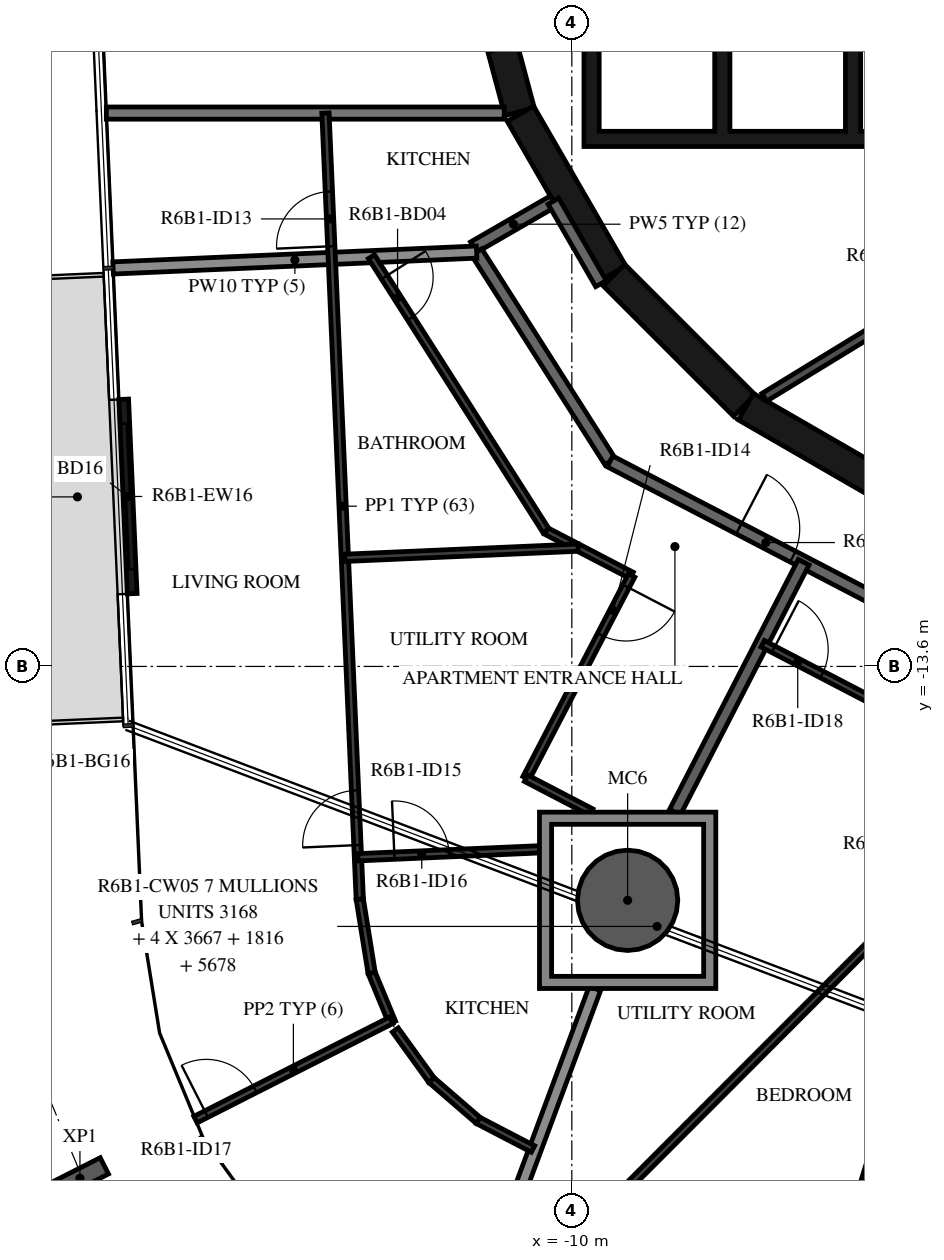
"""IFC4 building model, lengths in metres.
Left out: names, types, materials, properties, quantities, classifications, styles, units other than length and angle.
Written with IfcOpenShell. Run it as: python <this file> out.ifc"""

import sys

from ifc_helpers import new_model, si_unit, direction, frame, frame_2d, origin, origin_2d, place, context, subcontext, project, spatial, polyline, rectangle, hollow_circle, i_section, outline, extrude, element, fill, save


model = new_model("IFC4")
c1 = context("Model", 3, precision=1e-05, world=origin(), true_north=direction((0.0, 1.0)))
c2 = subcontext(c1, "Body", "Model", "MODEL_VIEW")
j1 = project(units=[si_unit("LENGTHUNIT", "METRE"), si_unit("PLANEANGLEUNIT", "RADIAN")], contexts=[c1])
p1 = place(None, origin())
s1 = spatial("IfcSite", under=j1, at=p1, CompositionType="ELEMENT")
p2 = place(p1, origin())
s2 = spatial("IfcBuilding", under=s1, at=p2, CompositionType="ELEMENT")
p3 = place(p2, frame((0.0, 0.0, 237.2)))
s3 = spatial("IfcBuildingStorey", under=s2, at=p3, CompositionType="ELEMENT", Elevation=237.2)
p4 = place(p3, frame((-9.082, -17.446, -0.38), z_axis=(0.0, 0.0, 1.0), x_axis=(1.0, 0.0, 0.0)))
e1 = element("IfcColumn", 1, at=p4, inside=s3, PredefinedType="COLUMN", context=c2, shape_type="SweptSolid", body=[
    extrude(hollow_circle(Radius=0.825, WallThickness=0.04, at=origin_2d()), origin(), (0.0, 0.0, 1.0), 3.5),
])
p5 = place(p3, frame((-18.089, -22.016, -0.38), z_axis=(0.0, 0.0, 1.0), x_axis=(-0.452473836659, 0.89177767809, 0.0)))
e2 = element("IfcColumn", 2, at=p5, inside=s3, PredefinedType="COLUMN", context=c2, shape_type="SweptSolid", body=[
    extrude(i_section(OverallWidth=0.3, OverallDepth=0.9, WebThickness=0.019, FlangeThickness=0.035, FilletRadius=0.03, at=origin_2d()), origin(), (0.0, 0.0, 1.0), 3.5),
])
p6 = place(p3, frame((-17.369, -9.207, 0.0), z_axis=(0.0, 0.0, 1.0), x_axis=(0.043639181999, -0.999047357133, 0.0)))
e3 = element("IfcWall", 3, at=p6, inside=s3, PredefinedType="STANDARD", context=c2, shape_type="SweptSolid", body=[
    extrude(rectangle(XDim=3.2, YDim=0.16, at=frame_2d((1.6, 0.0))), origin(), (0.0, 0.0, 1.0), 3.12),
])
p7 = place(p6, frame((0.4, 0.0, 0.0)))
e4 = element("IfcOpeningElement", 4, at=p7, cuts=e3, PredefinedType="OPENING", context=c2, shape_type="SweptSolid", body=[
    extrude(rectangle(XDim=2.4, YDim=2.4, at=frame_2d((1.2, 1.2))), frame((0.0, 0.09, 0.0), z_axis=(0.0, -1.0, 0.0), x_axis=(1.0, 0.0, 0.0)), (0.0, 0.0, 1.0), 0.18),
])
p8 = place(p3, frame((-11.643, -1.55, 0.0), z_axis=(0.0, 0.0, 1.0), x_axis=(0.258734743916, -0.965948410781, 0.0)))
e5 = element("IfcWall", 5, at=p8, inside=s3, PredefinedType="SHEAR", context=c2, shape_type="SweptSolid", body=[
    extrude(rectangle(XDim=3.033, YDim=0.5, at=frame_2d((1.516, 0.0))), origin(), (0.0, 0.0, 1.0), 3.12),
])
p9 = place(p8, frame((1.066, 0.0, 0.0)))
e6 = element("IfcOpeningElement", 6, at=p9, cuts=e5, PredefinedType="OPENING", context=c2, shape_type="SweptSolid", body=[
    extrude(rectangle(XDim=0.9, YDim=2.1, at=frame_2d((0.45, 1.05))), frame((0.0, 0.26, 0.0), z_axis=(0.0, -1.0, 0.0), x_axis=(1.0, 0.0, 0.0)), (0.0, 0.0, 1.0), 0.52),
])
p10 = place(p3, frame((-10.845, -4.51, 0.0), z_axis=(0.0, 0.0, 1.0), x_axis=(0.500087131594, -0.865975092491, 0.0)))
e7 = element("IfcWall", 7, at=p10, inside=s3, PredefinedType="SHEAR", context=c2, shape_type="SweptSolid", body=[
    extrude(rectangle(XDim=3.033, YDim=0.5, at=frame_2d((1.516, 0.0))), origin(), (0.0, 0.0, 1.0), 3.12),
])
p11 = place(p3, frame((-9.308, -7.164, 0.0), z_axis=(0.0, 0.0, 1.0), x_axis=(0.707106781187, -0.707106781187, 0.0)))
e8 = element("IfcWall", 8, at=p11, inside=s3, PredefinedType="SHEAR", context=c2, shape_type="SweptSolid", body=[
    extrude(rectangle(XDim=3.032, YDim=0.5, at=frame_2d((1.516, 0.0))), origin(), (0.0, 0.0, 1.0), 3.12),
])
p12 = place(p3, frame((-7.137, -9.329, 0.0), z_axis=(0.0, 0.0, 1.0), x_axis=(0.865975092491, -0.500087131594, 0.0)))
e9 = element("IfcWall", 9, at=p12, inside=s3, PredefinedType="SHEAR", context=c2, shape_type="SweptSolid", body=[
    extrude(rectangle(XDim=3.033, YDim=0.5, at=frame_2d((1.516, 0.0))), origin(), (0.0, 0.0, 1.0), 3.12),
])
p13 = place(p3, origin())
e10 = element("IfcWall", 10, at=p13, inside=s3, PredefinedType="SHEAR", context=c2, shape_type="SweptSolid", body=[
    extrude(outline(polyline([(9.8, -5.05), (9.8, -4.8), (9.8, -1.9), (9.55, -1.9), (9.55, -4.8), (7.65, -4.8), (7.65, -1.9), (7.4, -1.9), (7.4, -4.8), (5.5, -4.8), (5.5, -1.9), (5.25, -1.9), (5.25, -4.8), (3.35, -4.8), (3.35, -1.9), (3.1, -1.9), (3.1, -4.8), (1.2, -4.8), (1.2, -1.9), (0.95, -1.9), (0.95, -4.8), (-0.95, -4.8), (-0.95, -1.9), (-1.2, -1.9), (-1.2, -4.8), (-3.1, -4.8), (-3.1, -1.9), (-3.35, -1.9), (-3.35, -4.8), (-5.25, -4.8), (-5.25, -1.9), (-5.5, -1.9), (-5.5, -4.8), (-7.4, -4.8), (-7.4, -1.9), (-7.65, -1.9), (-7.65, -4.8), (-9.55, -4.8), (-9.55, -1.9), (-9.8, -1.9), (-9.8, -4.8), (-9.8, -5.05), (9.8, -5.05)])), origin(), (0.0, 0.0, 1.0), 3.12),
])
p14 = place(p3, frame((-2.451, -6.495, 0.0), z_axis=(0.0, 0.0, 1.0), x_axis=(-0.853250115418, -0.521501908471, 0.0)))
e11 = element("IfcWall", 11, at=p14, inside=s3, PredefinedType="PARTITIONING", context=c2, shape_type="SweptSolid", body=[
    extrude(rectangle(XDim=5.137, YDim=0.15, at=frame_2d((2.569, 0.0))), origin(), (0.0, 0.0, 1.0), 3.12),
])
p15 = place(p14, frame((2.119, 0.0, 0.0)))
e12 = element("IfcOpeningElement", 12, at=p15, cuts=e11, PredefinedType="OPENING", context=c2, shape_type="SweptSolid", body=[
    extrude(rectangle(XDim=0.9, YDim=2.1, at=frame_2d((0.45, 1.05))), frame((0.0, 0.085, 0.0), z_axis=(0.0, -1.0, 0.0), x_axis=(1.0, 0.0, 0.0)), (0.0, 0.0, 1.0), 0.17),
])
p16 = place(p3, frame((-10.303, -5.949, 0.0), z_axis=(0.0, 0.0, 1.0), x_axis=(-0.866043382451, -0.499968858743, 0.0)))
e13 = element("IfcWall", 13, at=p16, inside=s3, PredefinedType="STANDARD", context=c2, shape_type="SweptSolid", body=[
    extrude(rectangle(XDim=1.515, YDim=0.2, at=frame_2d((0.758, 0.0))), origin(), (0.0, 0.0, 1.0), 3.12),
])
p17 = place(p3, frame((-9.52, -7.305, 0.0), z_axis=(0.0, 0.0, 1.0), x_axis=(-0.500028278809, 0.866009076391, 0.0)))
e14 = element("IfcWall", 14, at=p17, inside=s3, PredefinedType="STANDARD", context=c2, shape_type="SweptSolid", body=[
    extrude(rectangle(XDim=1.566, YDim=0.2, at=frame_2d((0.783, 0.0))), origin(), (0.0, 0.0, 1.0), 3.12),
])
p18 = place(p3, frame((-11.565, -6.786, 0.0), z_axis=(0.0, 0.0, 1.0), x_axis=(0.537297327359, -0.843392898958, 0.0)))
e15 = element("IfcWall", 15, at=p18, inside=s3, PredefinedType="STANDARD", context=c2, shape_type="SweptSolid", body=[
    extrude(rectangle(XDim=4.081, YDim=0.2, at=frame_2d((2.041, 0.0))), origin(), (0.0, 0.0, 1.0), 3.12),
])
p19 = place(p3, frame((-9.372, -10.228, 0.0), z_axis=(0.0, 0.0, 1.0), x_axis=(0.887005184532, -0.461759464021, 0.0)))
e16 = element("IfcWall", 16, at=p19, inside=s3, PredefinedType="STANDARD", context=c2, shape_type="SweptSolid", body=[
    extrude(rectangle(XDim=7.181, YDim=0.2, at=frame_2d((3.591, 0.0))), origin(), (0.0, 0.0, 1.0), 3.12),
])
p20 = place(p19, frame((2.391, 0.0, 0.0)))
e17 = element("IfcOpeningElement", 17, at=p20, cuts=e16, PredefinedType="OPENING", context=c2, shape_type="SweptSolid", body=[
    extrude(rectangle(XDim=1.0, YDim=2.1, at=frame_2d((0.5, 1.05))), frame((0.0, 0.11, 0.0), z_axis=(0.0, -1.0, 0.0), x_axis=(1.0, 0.0, 0.0)), (0.0, 0.0, 1.0), 0.22),
])
p21 = place(p3, frame((-17.655, -4.5, 0.0), z_axis=(0.0, 0.0, 1.0), x_axis=(1.0, 0.0, 0.0)))
e18 = element("IfcWall", 18, at=p21, inside=s3, PredefinedType="STANDARD", context=c2, shape_type="SweptSolid", body=[
    extrude(rectangle(XDim=6.543, YDim=0.2, at=frame_2d((3.272, 0.0))), origin(), (0.0, 0.0, 1.0), 3.12),
])
p22 = place(p3, frame((-17.544, -7.047, 0.0), z_axis=(0.0, 0.0, 1.0), x_axis=(0.999046743906, 0.043653218555, 0.0)))
e19 = element("IfcWall", 19, at=p22, inside=s3, PredefinedType="STANDARD", context=c2, shape_type="SweptSolid", body=[
    extrude(rectangle(XDim=5.984, YDim=0.2, at=frame_2d((2.992, 0.0))), origin(), (0.0, 0.0, 1.0), 2.73),
])
p23 = place(p3, frame((-8.303, -15.996, 0.0), z_axis=(0.0, 0.0, 1.0), x_axis=(0.457702371186, 0.889105471477, 0.0)))
e20 = element("IfcWall", 20, at=p23, inside=s3, PredefinedType="STANDARD", context=c2, shape_type="SweptSolid", body=[
    extrude(rectangle(XDim=4.623, YDim=0.2, at=frame_2d((2.312, 0.0))), origin(), (0.0, 0.0, 1.0), 3.12),
])
p24 = place(p3, frame((-11.865, -24.939, 0.0), z_axis=(0.0, 0.0, 1.0), x_axis=(0.348245485283, 0.937403372076, 0.0)))
e21 = element("IfcWall", 21, at=p24, inside=s3, PredefinedType="STANDARD", context=c2, shape_type="SweptSolid", body=[
    extrude(rectangle(XDim=6.446, YDim=0.2, at=frame_2d((3.223, 0.0))), origin(), (0.0, 0.0, 1.0), 2.73),
])
p25 = place(p3, frame((-13.487, -17.429, 0.0), z_axis=(0.0, 0.0, 1.0), x_axis=(-0.043617336945, 0.999048311103, 0.0)))
e22 = element("IfcWall", 22, at=p25, inside=s3, PredefinedType="PARTITIONING", context=c2, shape_type="SweptSolid", body=[
    extrude(rectangle(XDim=12.941, YDim=0.12, at=frame_2d((6.47, 0.0))), origin(), (0.0, 0.0, 1.0), 3.12),
])
p26 = place(p25, frame((10.749, 0.0, 0.0)))
e23 = element("IfcOpeningElement", 23, at=p26, cuts=e22, PredefinedType="OPENING", context=c2, shape_type="SweptSolid", body=[
    extrude(rectangle(XDim=0.9, YDim=2.1, at=frame_2d((0.45, 1.05))), frame((0.0, 0.07, 0.0), z_axis=(0.0, -1.0, 0.0), x_axis=(1.0, 0.0, 0.0)), (0.0, 0.0, 1.0), 0.14),
])
p27 = place(p25, frame((0.892, 0.0, 0.0)))
e24 = element("IfcOpeningElement", 24, at=p27, cuts=e22, PredefinedType="OPENING", context=c2, shape_type="SweptSolid", body=[
    extrude(rectangle(XDim=0.9, YDim=2.1, at=frame_2d((0.45, 1.05))), frame((0.0, 0.07, 0.0), z_axis=(0.0, -1.0, 0.0), x_axis=(1.0, 0.0, 0.0)), (0.0, 0.0, 1.0), 0.14),
])
p28 = place(p3, frame((-13.295, -6.862, 0.0), z_axis=(0.0, 0.0, 1.0), x_axis=(0.537285929223, -0.84340016022, 0.0)))
e25 = element("IfcWall", 25, at=p28, inside=s3, PredefinedType="PARTITIONING", context=c2, shape_type="SweptSolid", body=[
    extrude(rectangle(XDim=5.349, YDim=0.12, at=frame_2d((2.675, 0.0))), origin(), (0.0, 0.0, 1.0), 3.12),
])
p29 = place(p28, frame((0.4, 0.0, 0.0)))
e26 = element("IfcOpeningElement", 26, at=p29, cuts=e25, PredefinedType="OPENING", context=c2, shape_type="SweptSolid", body=[
    extrude(rectangle(XDim=0.8, YDim=2.1, at=frame_2d((0.4, 1.05))), frame((0.0, 0.07, 0.0), z_axis=(0.0, -1.0, 0.0), x_axis=(1.0, 0.0, 0.0)), (0.0, 0.0, 1.0), 0.14),
])
p30 = place(p3, frame((-10.421, -11.373, 0.0), z_axis=(0.0, 0.0, 1.0), x_axis=(0.887065333052, -0.461643904864, 0.0)))
e27 = element("IfcWall", 27, at=p30, inside=s3, PredefinedType="PARTITIONING", context=c2, shape_type="SweptSolid", body=[
    extrude(rectangle(XDim=1.584, YDim=0.12, at=frame_2d((0.792, 0.0))), origin(), (0.0, 0.0, 1.0), 3.12),
])
p31 = place(p3, frame((-9.016, -12.104, 0.0), z_axis=(0.0, 0.0, 1.0), x_axis=(-0.4617534789, -0.887008300256, 0.0)))
e28 = element("IfcWall", 28, at=p31, inside=s3, PredefinedType="PARTITIONING", context=c2, shape_type="SweptSolid", body=[
    extrude(rectangle(XDim=3.759, YDim=0.12, at=frame_2d((1.88, 0.0))), origin(), (0.0, 0.0, 1.0), 3.12),
])
p32 = place(p31, frame((0.2, 0.0, 0.0)))
e29 = element("IfcOpeningElement", 29, at=p32, cuts=e28, PredefinedType="OPENING", context=c2, shape_type="SweptSolid", body=[
    extrude(rectangle(XDim=0.9, YDim=2.1, at=frame_2d((0.45, 1.05))), frame((0.0, 0.07, 0.0), z_axis=(0.0, -1.0, 0.0), x_axis=(1.0, 0.0, 0.0)), (0.0, 0.0, 1.0), 0.14),
])
p33 = place(p3, frame((-10.752, -15.439, 0.0), z_axis=(0.0, 0.0, 1.0), x_axis=(0.887031383626, -0.461709134048, 0.0)))
e30 = element("IfcWall", 30, at=p33, inside=s3, PredefinedType="PARTITIONING", context=c2, shape_type="SweptSolid", body=[
    extrude(rectangle(XDim=1.208, YDim=0.12, at=frame_2d((0.604, 0.0))), origin(), (0.0, 0.0, 1.0), 3.12),
])
p34 = place(p3, frame((-13.732, -11.814, 0.0), z_axis=(0.0, 0.0, 1.0), x_axis=(0.999048344587, 0.043616569999, 0.0)))
e31 = element("IfcWall", 31, at=p34, inside=s3, PredefinedType="PARTITIONING", context=c2, shape_type="SweptSolid", body=[
    extrude(rectangle(XDim=3.84, YDim=0.12, at=frame_2d((1.92, 0.0))), origin(), (0.0, 0.0, 1.0), 3.12),
])
p35 = place(p3, frame((-12.954, -19.456, 0.0), z_axis=(0.0, 0.0, 1.0), x_axis=(-0.382807777256, 0.923828017367, 0.0)))
e32 = element("IfcWall", 32, at=p35, inside=s3, PredefinedType="PARTITIONING", context=c2, shape_type="SweptSolid", body=[
    extrude(rectangle(XDim=0.883, YDim=0.12, at=frame_2d((0.441, 0.0))), origin(), (0.0, 0.0, 1.0), 3.12),
])
p36 = place(p3, frame((-13.292, -18.64, 0.0), z_axis=(0.0, 0.0, 1.0), x_axis=(-0.159363796836, 0.98721992497, 0.0)))
e33 = element("IfcWall", 33, at=p36, inside=s3, PredefinedType="PARTITIONING", context=c2, shape_type="SweptSolid", body=[
    extrude(rectangle(XDim=1.227, YDim=0.12, at=frame_2d((0.614, 0.0))), origin(), (0.0, 0.0, 1.0), 3.12),
])
p37 = place(p3, frame((-16.189, -21.052, 0.0), z_axis=(0.0, 0.0, 1.0), x_axis=(0.891801938239, 0.452426019316, 0.0)))
e34 = element("IfcWall", 34, at=p37, inside=s3, PredefinedType="PARTITIONING", context=c2, shape_type="SweptSolid", body=[
    extrude(rectangle(XDim=3.611, YDim=0.12, at=frame_2d((1.805, 0.0))), origin(), (0.0, 0.0, 1.0), 2.73),
])
p38 = place(p37, frame((0.2, 0.0, 0.0)))
e35 = element("IfcOpeningElement", 35, at=p38, cuts=e34, PredefinedType="OPENING", context=c2, shape_type="SweptSolid", body=[
    extrude(rectangle(XDim=0.9, YDim=2.1, at=frame_2d((0.45, 1.05))), frame((0.0, 0.07, 0.0), z_axis=(0.0, -1.0, 0.0), x_axis=(1.0, 0.0, 0.0)), (0.0, 0.0, 1.0), 0.14),
])
p39 = place(p3, frame((-13.517, -16.738, 0.0), z_axis=(0.0, 0.0, 1.0), x_axis=(0.999047660155, 0.043632244256, 0.0)))
e36 = element("IfcWall", 36, at=p39, inside=s3, PredefinedType="PARTITIONING", context=c2, shape_type="SweptSolid", body=[
    extrude(rectangle(XDim=2.988, YDim=0.12, at=frame_2d((1.494, 0.0))), origin(), (0.0, 0.0, 1.0), 3.12),
])
p40 = place(p39, frame((0.6, 0.0, 0.0)))
e37 = element("IfcOpeningElement", 37, at=p40, cuts=e36, PredefinedType="OPENING", context=c2, shape_type="SweptSolid", body=[
    extrude(rectangle(XDim=0.9, YDim=2.1, at=frame_2d((0.45, 1.05))), frame((0.0, 0.07, 0.0), z_axis=(0.0, -1.0, 0.0), x_axis=(1.0, 0.0, 0.0)), (0.0, 0.0, 1.0), 0.14),
])
for number, where, z_axis, x_axis in (
    (38, (-12.903, -19.579, 0.0), (0.0, 0.0, 1.0), (0.585, -0.811, 0.0)),
    (39, (-12.308, -20.402, 0.0), (0.0, 0.0, 1.0), (0.757, -0.654, 0.0)),
    (40, (-11.539, -21.067, 0.0), (0.0, 0.0, 1.0), (0.887, -0.462, 0.0)),
):
    element("IfcWall", number, at=place(p3, frame(where, z_axis=z_axis, x_axis=x_axis)), inside=s3, PredefinedType="PARTITIONING", context=c2, shape_type="SweptSolid", body=[
        extrude(rectangle(XDim=1.016, YDim=0.12, at=frame_2d((0.508, 0.0))), origin(), (0.0, 0.0, 1.0), 3.12),
    ])
p41 = place(p3, frame((-6.861, -13.226, 0.0), z_axis=(0.0, 0.0, 1.0), x_axis=(0.887010791097, -0.461748694073, 0.0)))
e41 = element("IfcWall", 41, at=p41, inside=s3, PredefinedType="PARTITIONING", context=c2, shape_type="SweptSolid", body=[
    extrude(rectangle(XDim=3.727, YDim=0.12, at=frame_2d((1.864, 0.0))), origin(), (0.0, 0.0, 1.0), 3.12),
])
p42 = place(p41, frame((0.2, 0.0, 0.0)))
e42 = element("IfcOpeningElement", 42, at=p42, cuts=e41, PredefinedType="OPENING", context=c2, shape_type="SweptSolid", body=[
    extrude(rectangle(XDim=0.9, YDim=2.1, at=frame_2d((0.45, 1.05))), frame((0.0, 0.07, 0.0), z_axis=(0.0, -1.0, 0.0), x_axis=(1.0, 0.0, 0.0)), (0.0, 0.0, 1.0), 0.14),
])
p43 = place(p3, frame((-11.862, -24.94, 0.0), z_axis=(0.0, 0.0, 1.0), x_axis=(0.70663293894, 0.707580306117, 0.0)))
e43 = element("IfcWall", 43, at=p43, inside=s3, PredefinedType="PARTITIONING", context=c2, shape_type="SweptSolid", body=[
    extrude(rectangle(XDim=11.854, YDim=0.12, at=frame_2d((5.927, 0.0))), origin(), (0.0, 0.0, 1.0), 3.12),
])
p44 = place(p43, frame((1.9, 0.0, 0.0)))
e44 = element("IfcOpeningElement", 44, at=p44, cuts=e43, PredefinedType="OPENING", context=c2, shape_type="SweptSolid", body=[
    extrude(rectangle(XDim=0.9, YDim=2.1, at=frame_2d((0.45, 1.05))), frame((0.0, 0.07, 0.0), z_axis=(0.0, -1.0, 0.0), x_axis=(1.0, 0.0, 0.0)), (0.0, 0.0, 1.0), 0.14),
])
p45 = place(p3, frame((-6.026, -24.795, 0.0), z_axis=(0.0, 0.0, 1.0), x_axis=(0.294501505058, 0.955651015548, 0.0)))
e45 = element("IfcWall", 45, at=p45, inside=s3, PredefinedType="PARTITIONING", context=c2, shape_type="SweptSolid", body=[
    extrude(rectangle(XDim=8.626, YDim=0.12, at=frame_2d((4.313, 0.0))), origin(), (0.0, 0.0, 1.0), 3.12),
])
p46 = place(p45, frame((0.7, 0.0, 0.0)))
e46 = element("IfcOpeningElement", 46, at=p46, cuts=e45, PredefinedType="OPENING", context=c2, shape_type="SweptSolid", body=[
    extrude(rectangle(XDim=0.8, YDim=2.1, at=frame_2d((0.4, 1.05))), frame((0.0, 0.07, 0.0), z_axis=(0.0, -1.0, 0.0), x_axis=(1.0, 0.0, 0.0)), (0.0, 0.0, 1.0), 0.14),
])
p47 = place(p3, origin())
e47 = element("IfcWall", 47, at=p47, inside=s3, PredefinedType="STANDARD", context=c2, shape_type="SweptSolid", body=[
    extrude(outline(polyline([(-7.632, -15.996), (-7.632, -18.896), (-10.532, -18.896), (-10.532, -15.996), (-7.632, -15.996)]), holes=[polyline([(-10.332, -18.696), (-7.832, -18.696), (-7.832, -16.196), (-10.332, -16.196), (-10.332, -18.696)])]), origin(), (0.0, 0.0, 1.0), 3.12),
])
p48 = place(p7, origin())
e48 = element("IfcDoor", 48, at=p48, inside=s3, OperationType="DOUBLE_DOOR_SLIDING", PredefinedType="DOOR", context=c2, shape_type="SweptSolid", body=[
    extrude(rectangle(XDim=2.4, YDim=2.4, at=frame_2d((1.2, 1.2))), frame((0.0, 0.025, 0.0), z_axis=(0.0, -1.0, 0.0), x_axis=(1.0, 0.0, 0.0)), (0.0, 0.0, 1.0), 0.05),
])
fill(e4, e48)
p49 = place(p26, origin())
e49 = element("IfcDoor", 49, at=p49, inside=s3, OperationType="SINGLE_SWING_LEFT", PredefinedType="DOOR", context=c2, shape_type="SweptSolid", body=[
    extrude(rectangle(XDim=0.9, YDim=2.1, at=frame_2d((0.45, 1.05))), frame((0.0, 0.025, 0.0), z_axis=(0.0, -1.0, 0.0), x_axis=(1.0, 0.0, 0.0)), (0.0, 0.0, 1.0), 0.05),
])
fill(e23, e49)
p50 = place(p20, origin())
e50 = element("IfcDoor", 50, at=p50, inside=s3, OperationType="SINGLE_SWING_RIGHT", PredefinedType="DOOR", context=c2, shape_type="SweptSolid", body=[
    extrude(rectangle(XDim=1.0, YDim=2.1, at=frame_2d((0.5, 1.05))), frame((0.0, 0.025, 0.0), z_axis=(0.0, -1.0, 0.0), x_axis=(1.0, 0.0, 0.0)), (0.0, 0.0, 1.0), 0.05),
])
fill(e17, e50)
p51 = place(p29, origin())
e51 = element("IfcDoor", 51, at=p51, inside=s3, OperationType="SINGLE_SWING_RIGHT", PredefinedType="DOOR", context=c2, shape_type="SweptSolid", body=[
    extrude(rectangle(XDim=0.8, YDim=2.1, at=frame_2d((0.4, 1.05))), frame((0.0, 0.025, 0.0), z_axis=(0.0, -1.0, 0.0), x_axis=(1.0, 0.0, 0.0)), (0.0, 0.0, 1.0), 0.05),
])
fill(e26, e51)
p52 = place(p32, origin())
e52 = element("IfcDoor", 52, at=p52, inside=s3, OperationType="SINGLE_SWING_RIGHT", PredefinedType="DOOR", context=c2, shape_type="SweptSolid", body=[
    extrude(rectangle(XDim=0.9, YDim=2.1, at=frame_2d((0.45, 1.05))), frame((0.0, 0.025, 0.0), z_axis=(0.0, -1.0, 0.0), x_axis=(1.0, 0.0, 0.0)), (0.0, 0.0, 1.0), 0.05),
])
fill(e29, e52)
p53 = place(p27, origin())
e53 = element("IfcDoor", 53, at=p53, inside=s3, OperationType="SINGLE_SWING_RIGHT", PredefinedType="DOOR", context=c2, shape_type="SweptSolid", body=[
    extrude(rectangle(XDim=0.9, YDim=2.1, at=frame_2d((0.45, 1.05))), frame((0.0, 0.025, 0.0), z_axis=(0.0, -1.0, 0.0), x_axis=(1.0, 0.0, 0.0)), (0.0, 0.0, 1.0), 0.05),
])
fill(e24, e53)
p54 = place(p40, origin())
e54 = element("IfcDoor", 54, at=p54, inside=s3, OperationType="SINGLE_SWING_RIGHT", PredefinedType="DOOR", context=c2, shape_type="SweptSolid", body=[
    extrude(rectangle(XDim=0.9, YDim=2.1, at=frame_2d((0.45, 1.05))), frame((0.0, 0.025, 0.0), z_axis=(0.0, -1.0, 0.0), x_axis=(1.0, 0.0, 0.0)), (0.0, 0.0, 1.0), 0.05),
])
fill(e37, e54)
p55 = place(p38, origin())
e55 = element("IfcDoor", 55, at=p55, inside=s3, OperationType="SINGLE_SWING_RIGHT", PredefinedType="DOOR", context=c2, shape_type="SweptSolid", body=[
    extrude(rectangle(XDim=0.9, YDim=2.1, at=frame_2d((0.45, 1.05))), frame((0.0, 0.025, 0.0), z_axis=(0.0, -1.0, 0.0), x_axis=(1.0, 0.0, 0.0)), (0.0, 0.0, 1.0), 0.05),
])
fill(e35, e55)
p56 = place(p42, origin())
e56 = element("IfcDoor", 56, at=p56, inside=s3, OperationType="SINGLE_SWING_LEFT", PredefinedType="DOOR", context=c2, shape_type="SweptSolid", body=[
    extrude(rectangle(XDim=0.9, YDim=2.1, at=frame_2d((0.45, 1.05))), frame((0.0, 0.025, 0.0), z_axis=(0.0, -1.0, 0.0), x_axis=(1.0, 0.0, 0.0)), (0.0, 0.0, 1.0), 0.05),
])
fill(e42, e56)
save(model, sys.argv[1])
